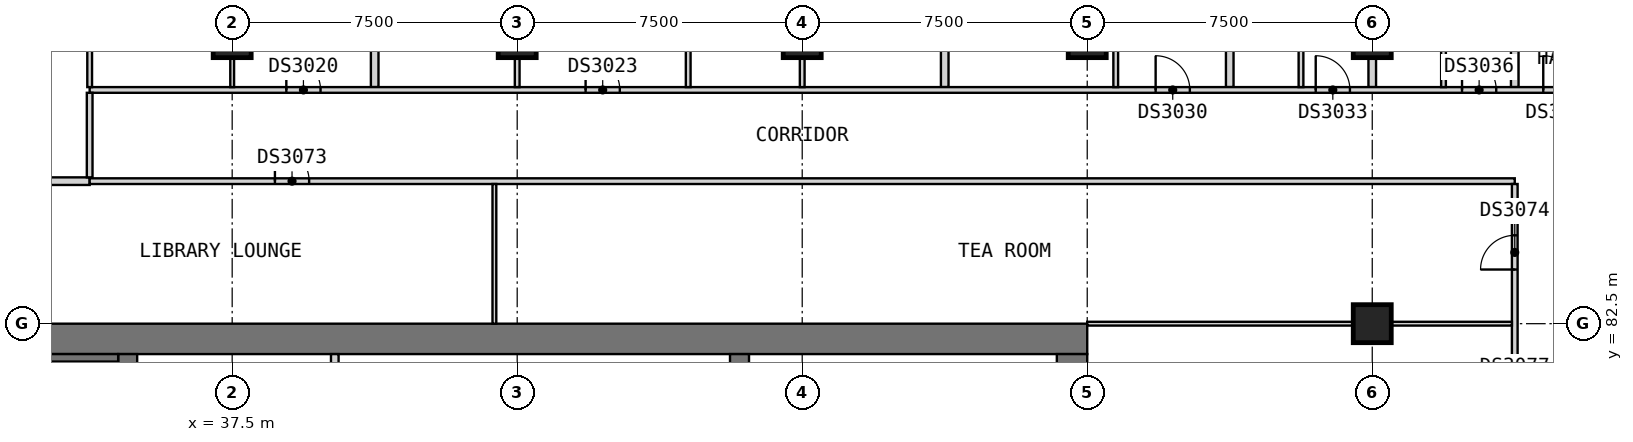
"""IFC4 building model, lengths in metres.
Left out: names, types, materials, properties, quantities, classifications, styles, units other than length and angle.
Written with IfcOpenShell. Run it as: python <this file> out.ifc"""

import sys

from ifc_helpers import new_model, si_unit, direction, frame, frame_2d, origin, origin_2d, place, context, subcontext, project, spatial, rectangle, extrude, element, fill, save


model = new_model("IFC4")
c1 = context("Model", 3, precision=1e-05, world=origin(), true_north=direction((0.0, 1.0)))
c2 = subcontext(c1, "Body", "Model", "MODEL_VIEW")
j1 = project(units=[si_unit("LENGTHUNIT", "METRE"), si_unit("PLANEANGLEUNIT", "RADIAN")], contexts=[c1])
p1 = place(None, origin())
s1 = spatial("IfcSite", under=j1, at=p1, CompositionType="ELEMENT")
p2 = place(p1, origin())
s2 = spatial("IfcBuilding", under=s1, at=p2, CompositionType="ELEMENT")
p3 = place(p2, frame((0.0, 0.0, 137.4)))
s3 = spatial("IfcBuildingStorey", under=s2, at=p3, CompositionType="ELEMENT", Elevation=137.4)
for number, where, z_axis, x_axis in (
    (1, (37.5, 90.0, 0.0), (0.0, 0.0, 1.0), (1.0, 0.0, 0.0)),
    (2, (45.0, 90.0, 0.0), (0.0, 0.0, 1.0), (1.0, 0.0, 0.0)),
    (3, (52.5, 90.0, 0.0), (0.0, 0.0, 1.0), (1.0, 0.0, 0.0)),
    (4, (60.0, 90.0, 0.0), (0.0, 0.0, 1.0), (1.0, 0.0, 0.0)),
    (5, (67.5, 82.5, 0.0), (0.0, 0.0, 1.0), (1.0, 0.0, 0.0)),
    (6, (67.5, 90.0, 0.0), (0.0, 0.0, 1.0), (1.0, 0.0, 0.0)),
):
    element("IfcColumn", number, at=place(p3, frame(where, z_axis=z_axis, x_axis=x_axis)), inside=s3, PredefinedType="COLUMN", context=c2, shape_type="SweptSolid", body=[
        extrude(rectangle(XDim=1.0, YDim=1.0, at=origin_2d()), origin(), (0.0, 0.0, 1.0), 3.6),
    ])
p4 = place(p3, frame((30.0, 82.1, 0.0), z_axis=(0.0, 0.0, 1.0), x_axis=(1.0, 0.0, 0.0)))
e7 = element("IfcWall", 7, at=p4, inside=s3, PredefinedType="SHEAR", context=c2, shape_type="SweptSolid", body=[
    extrude(rectangle(XDim=30.0, YDim=0.8, at=frame_2d((15.0, 0.0))), origin(), (0.0, 0.0, 1.0), 3.6),
])
p5 = place(p3, frame((59.6, 60.8, 0.0), z_axis=(0.0, 0.0, 1.0), x_axis=(0.0, 1.0, 0.0)))
e8 = element("IfcWall", 8, at=p5, inside=s3, PredefinedType="SHEAR", context=c2, shape_type="SweptSolid", body=[
    extrude(rectangle(XDim=20.9, YDim=0.8, at=frame_2d((10.45, 0.0))), origin(), (0.0, 0.0, 1.0), 3.6),
])
p6 = place(p5, frame((14.7, 0.0, 0.0)))
e9 = element("IfcOpeningElement", 9, at=p6, cuts=e8, PredefinedType="OPENING", context=c2, shape_type="SweptSolid", body=[
    extrude(rectangle(XDim=1.8, YDim=2.1, at=frame_2d((0.9, 1.05))), frame((0.0, 0.41, 0.0), z_axis=(0.0, -1.0, 0.0), x_axis=(1.0, 0.0, 0.0)), (0.0, 0.0, 1.0), 0.82),
])
for number, where, z_axis, x_axis in (
    (10, (34.75, 78.3, 0.0), (0.0, 0.0, 1.0), (0.0, 1.0, 0.0)),
    (11, (50.85, 78.3, 0.0), (0.0, 0.0, 1.0), (0.0, 1.0, 0.0)),
):
    element("IfcWall", number, at=place(p3, frame(where, z_axis=z_axis, x_axis=x_axis)), inside=s3, PredefinedType="SHEAR", context=c2, shape_type="SweptSolid", body=[
        extrude(rectangle(XDim=3.4, YDim=0.5, at=frame_2d((1.7, 0.0))), origin(), (0.0, 0.0, 1.0), 3.6),
    ])
p7 = place(p3, frame((40.2, 78.5, 0.0), z_axis=(0.0, 0.0, 1.0), x_axis=(0.0, 1.0, 0.0)))
e12 = element("IfcWall", 12, at=p7, inside=s3, PredefinedType="SOLIDWALL", context=c2, shape_type="SweptSolid", body=[
    extrude(rectangle(XDim=3.2, YDim=0.2, at=frame_2d((1.6, 0.0))), origin(), (0.0, 0.0, 1.0), 3.6),
])
p8 = place(p3, frame((31.0, 81.6, 0.0), z_axis=(0.0, 0.0, 1.0), x_axis=(1.0, 0.0, 0.0)))
e13 = element("IfcWall", 13, at=p8, inside=s3, PredefinedType="SOLIDWALL", context=c2, shape_type="SweptSolid", body=[
    extrude(rectangle(XDim=3.5, YDim=0.2, at=frame_2d((1.75, 0.0))), origin(), (0.0, 0.0, 1.0), 3.35),
])
p9 = place(p3, frame((30.81, 86.25, 0.0), z_axis=(0.0, 0.0, 1.0), x_axis=(1.0, 0.0, 0.0)))
e14 = element("IfcWall", 14, at=p9, inside=s3, PredefinedType="PARTITIONING", context=c2, shape_type="SweptSolid", body=[
    extrude(rectangle(XDim=2.94, YDim=0.2, at=frame_2d((1.47, 0.0))), origin(), (0.0, 0.0, 1.0), 3.35),
])
for number, where, z_axis, x_axis in (
    (15, (41.25, 88.725, 0.0), (0.0, 0.0, 1.0), (0.0, 1.0, 0.0)),
    (16, (56.25, 88.725, 0.0), (0.0, 0.0, 1.0), (0.0, 1.0, 0.0)),
    (17, (63.75, 88.725, 0.0), (0.0, 0.0, 1.0), (0.0, 1.0, 0.0)),
):
    element("IfcWall", number, at=place(p3, frame(where, z_axis=z_axis, x_axis=x_axis)), inside=s3, PredefinedType="PARTITIONING", context=c2, shape_type="SweptSolid", body=[
        extrude(rectangle(XDim=11.715, YDim=0.2, at=frame_2d((5.857, 0.0))), origin(), (0.0, 0.0, 1.0), 3.35),
    ])
p10 = place(p3, frame((67.5, 88.725, 0.0), z_axis=(0.0, 0.0, 1.0), x_axis=(0.0, 1.0, 0.0)))
e18 = element("IfcWall", 18, at=p10, inside=s3, PredefinedType="PARTITIONING", context=c2, shape_type="SweptSolid", body=[
    extrude(rectangle(XDim=12.525, YDim=0.2, at=frame_2d((6.262, 0.0))), origin(), (0.0, 0.0, 1.0), 3.35),
])
p11 = place(p3, frame((71.25, 88.725, 0.0), z_axis=(0.0, 0.0, 1.0), x_axis=(0.0, 1.0, 0.0)))
e19 = element("IfcWall", 19, at=p11, inside=s3, PredefinedType="PARTITIONING", context=c2, shape_type="SweptSolid", body=[
    extrude(rectangle(XDim=11.715, YDim=0.2, at=frame_2d((5.857, 0.0))), origin(), (0.0, 0.0, 1.0), 3.35),
])
p12 = place(p3, frame((33.75, 86.25, 0.0), z_axis=(0.0, 0.0, 1.0), x_axis=(1.0, 0.0, 0.0)))
e20 = element("IfcWall", 20, at=p12, inside=s3, PredefinedType="PARTITIONING", context=c2, shape_type="SweptSolid", body=[
    extrude(rectangle(XDim=37.5, YDim=0.15, at=frame_2d((18.75, 0.0))), origin(), (0.0, 0.0, 1.0), 3.35),
])
p13 = place(p12, frame((4.875, 0.0, 0.0)))
e21 = element("IfcOpeningElement", 21, at=p13, cuts=e20, PredefinedType="OPENING", context=c2, shape_type="SweptSolid", body=[
    extrude(rectangle(XDim=0.9, YDim=2.1, at=frame_2d((0.45, 1.05))), frame((0.0, 0.085, 0.0), z_axis=(0.0, -1.0, 0.0), x_axis=(1.0, 0.0, 0.0)), (0.0, 0.0, 1.0), 0.17),
])
p14 = place(p3, frame((33.75, 88.65, 0.0), z_axis=(0.0, 0.0, 1.0), x_axis=(1.0, 0.0, 0.0)))
e22 = element("IfcWall", 22, at=p14, inside=s3, PredefinedType="PARTITIONING", context=c2, shape_type="SweptSolid", body=[
    extrude(rectangle(XDim=39.9, YDim=0.15, at=frame_2d((19.95, 0.0))), origin(), (0.0, 0.0, 1.0), 3.35),
])
p15 = place(p14, frame((5.175, 0.0, 0.0)))
e23 = element("IfcOpeningElement", 23, at=p15, cuts=e22, PredefinedType="OPENING", context=c2, shape_type="SweptSolid", body=[
    extrude(rectangle(XDim=0.9, YDim=2.1, at=frame_2d((0.45, 1.05))), frame((0.0, 0.085, 0.0), z_axis=(0.0, -1.0, 0.0), x_axis=(1.0, 0.0, 0.0)), (0.0, 0.0, 1.0), 0.17),
])
p16 = place(p14, frame((13.05, 0.0, 0.0)))
e24 = element("IfcOpeningElement", 24, at=p16, cuts=e22, PredefinedType="OPENING", context=c2, shape_type="SweptSolid", body=[
    extrude(rectangle(XDim=0.9, YDim=2.1, at=frame_2d((0.45, 1.05))), frame((0.0, 0.085, 0.0), z_axis=(0.0, -1.0, 0.0), x_axis=(1.0, 0.0, 0.0)), (0.0, 0.0, 1.0), 0.17),
])
p17 = place(p14, frame((28.05, 0.0, 0.0)))
e25 = element("IfcOpeningElement", 25, at=p17, cuts=e22, PredefinedType="OPENING", context=c2, shape_type="SweptSolid", body=[
    extrude(rectangle(XDim=0.9, YDim=2.1, at=frame_2d((0.45, 1.05))), frame((0.0, 0.085, 0.0), z_axis=(0.0, -1.0, 0.0), x_axis=(1.0, 0.0, 0.0)), (0.0, 0.0, 1.0), 0.17),
])
p18 = place(p14, frame((32.262, 0.0, 0.0)))
e26 = element("IfcOpeningElement", 26, at=p18, cuts=e22, PredefinedType="OPENING", context=c2, shape_type="SweptSolid", body=[
    extrude(rectangle(XDim=0.9, YDim=2.1, at=frame_2d((0.45, 1.05))), frame((0.0, 0.085, 0.0), z_axis=(0.0, -1.0, 0.0), x_axis=(1.0, 0.0, 0.0)), (0.0, 0.0, 1.0), 0.17),
])
p19 = place(p14, frame((36.113, 0.0, 0.0)))
e27 = element("IfcOpeningElement", 27, at=p19, cuts=e22, PredefinedType="OPENING", context=c2, shape_type="SweptSolid", body=[
    extrude(rectangle(XDim=0.9, YDim=2.1, at=frame_2d((0.45, 1.05))), frame((0.0, 0.085, 0.0), z_axis=(0.0, -1.0, 0.0), x_axis=(1.0, 0.0, 0.0)), (0.0, 0.0, 1.0), 0.17),
])
p20 = place(p14, frame((38.25, 0.0, 0.0)))
e28 = element("IfcOpeningElement", 28, at=p20, cuts=e22, PredefinedType="OPENING", context=c2, shape_type="SweptSolid", body=[
    extrude(rectangle(XDim=0.9, YDim=2.1, at=frame_2d((0.45, 1.05))), frame((0.0, 0.085, 0.0), z_axis=(0.0, -1.0, 0.0), x_axis=(1.0, 0.0, 0.0)), (0.0, 0.0, 1.0), 0.17),
])
p21 = place(p3, frame((33.75, 86.35, 0.0), z_axis=(0.0, 0.0, 1.0), x_axis=(0.0, 1.0, 0.0)))
e29 = element("IfcWall", 29, at=p21, inside=s3, PredefinedType="PARTITIONING", context=c2, shape_type="SweptSolid", body=[
    extrude(rectangle(XDim=2.225, YDim=0.15, at=frame_2d((1.112, 0.0))), origin(), (0.0, 0.0, 1.0), 3.35),
])
p22 = place(p3, frame((71.25, 78.075, 0.0), z_axis=(0.0, 0.0, 1.0), x_axis=(0.0, 1.0, 0.0)))
e30 = element("IfcWall", 30, at=p22, inside=s3, PredefinedType="PARTITIONING", context=c2, shape_type="SweptSolid", body=[
    extrude(rectangle(XDim=8.1, YDim=0.15, at=frame_2d((4.05, 0.0))), origin(), (0.0, 0.0, 1.0), 3.35),
])
p23 = place(p22, frame((5.85, 0.0, 0.0)))
e31 = element("IfcOpeningElement", 31, at=p23, cuts=e30, PredefinedType="OPENING", context=c2, shape_type="SweptSolid", body=[
    extrude(rectangle(XDim=0.9, YDim=2.1, at=frame_2d((0.45, 1.05))), frame((0.0, 0.085, 0.0), z_axis=(0.0, -1.0, 0.0), x_axis=(1.0, 0.0, 0.0)), (0.0, 0.0, 1.0), 0.17),
])
p24 = place(p22, frame((1.725, 0.0, 0.0)))
e32 = element("IfcOpeningElement", 32, at=p24, cuts=e30, PredefinedType="OPENING", context=c2, shape_type="SweptSolid", body=[
    extrude(rectangle(XDim=0.9, YDim=2.1, at=frame_2d((0.45, 1.05))), frame((0.0, 0.085, 0.0), z_axis=(0.0, -1.0, 0.0), x_axis=(1.0, 0.0, 0.0)), (0.0, 0.0, 1.0), 0.17),
])
p25 = place(p3, frame((60.0, 82.5, 0.0), z_axis=(0.0, 0.0, 1.0), x_axis=(1.0, 0.0, 0.0)))
e33 = element("IfcWall", 33, at=p25, inside=s3, PredefinedType="PARTITIONING", context=c2, shape_type="SweptSolid", body=[
    extrude(rectangle(XDim=11.175, YDim=0.1, at=frame_2d((5.587, 0.0))), origin(), (0.0, 0.0, 1.0), 3.35),
])
p26 = place(p3, frame((37.5, 88.725, 0.0), z_axis=(0.0, 0.0, 1.0), x_axis=(0.0, 1.0, 0.0)))
e34 = element("IfcWall", 34, at=p26, inside=s3, PredefinedType="PARTITIONING", context=c2, shape_type="SweptSolid", body=[
    extrude(rectangle(XDim=4.475, YDim=0.1, at=frame_2d((2.237, 0.0))), origin(), (0.0, 0.0, 1.0), 3.35),
])
p27 = place(p26, frame((1.825, 0.0, 0.0)))
e35 = element("IfcOpeningElement", 35, at=p27, cuts=e34, PredefinedType="OPENING", context=c2, shape_type="SweptSolid", body=[
    extrude(rectangle(XDim=0.9, YDim=2.1, at=frame_2d((0.45, 1.05))), frame((0.0, 0.06, 0.0), z_axis=(0.0, -1.0, 0.0), x_axis=(1.0, 0.0, 0.0)), (0.0, 0.0, 1.0), 0.12),
])
p28 = place(p3, frame((44.4, 82.5, 0.0), z_axis=(0.0, 0.0, 1.0), x_axis=(0.0, 1.0, 0.0)))
e36 = element("IfcWall", 36, at=p28, inside=s3, PredefinedType="PARTITIONING", context=c2, shape_type="SweptSolid", body=[
    extrude(rectangle(XDim=3.675, YDim=0.1, at=frame_2d((1.837, 0.0))), origin(), (0.0, 0.0, 1.0), 3.35),
])
for number, where, z_axis, x_axis in (
    (37, (33.75, 88.725, 0.0), (0.0, 0.0, 1.0), (0.0, 1.0, 0.0)),
    (38, (45.0, 88.725, 0.0), (0.0, 0.0, 1.0), (0.0, 1.0, 0.0)),
):
    element("IfcWall", number, at=place(p3, frame(where, z_axis=z_axis, x_axis=x_axis)), inside=s3, PredefinedType="PARTITIONING", context=c2, shape_type="SweptSolid", body=[
        extrude(rectangle(XDim=4.462, YDim=0.125, at=frame_2d((2.231, 0.0))), origin(), (0.0, 0.0, 1.0), 3.35),
    ])
p29 = place(p3, frame((49.5, 88.725, 0.0), z_axis=(0.0, 0.0, 1.0), x_axis=(0.0, 1.0, 0.0)))
e39 = element("IfcWall", 39, at=p29, inside=s3, PredefinedType="PARTITIONING", context=c2, shape_type="SweptSolid", body=[
    extrude(rectangle(XDim=4.462, YDim=0.125, at=frame_2d((2.231, 0.0))), origin(), (0.0, 0.0, 1.0), 3.35),
])
p30 = place(p29, frame((1.775, 0.0, 0.0)))
e40 = element("IfcOpeningElement", 40, at=p30, cuts=e39, PredefinedType="OPENING", context=c2, shape_type="SweptSolid", body=[
    extrude(rectangle(XDim=0.9, YDim=2.1, at=frame_2d((0.45, 1.05))), frame((0.0, 0.073, 0.0), z_axis=(0.0, -1.0, 0.0), x_axis=(1.0, 0.0, 0.0)), (0.0, 0.0, 1.0), 0.145),
])
for number, where, z_axis, x_axis in (
    (41, (52.5, 88.725, 0.0), (0.0, 0.0, 1.0), (0.0, 1.0, 0.0)),
    (42, (60.75, 88.725, 0.0), (0.0, 0.0, 1.0), (0.0, 1.0, 0.0)),
    (43, (65.625, 88.725, 0.0), (0.0, 0.0, 1.0), (0.0, 1.0, 0.0)),
    (44, (69.375, 88.725, 0.0), (0.0, 0.0, 1.0), (0.0, 1.0, 0.0)),
):
    element("IfcWall", number, at=place(p3, frame(where, z_axis=z_axis, x_axis=x_axis)), inside=s3, PredefinedType="PARTITIONING", context=c2, shape_type="SweptSolid", body=[
        extrude(rectangle(XDim=4.462, YDim=0.125, at=frame_2d((2.231, 0.0))), origin(), (0.0, 0.0, 1.0), 3.35),
    ])
p31 = place(p15, origin())
e45 = element("IfcDoor", 45, at=p31, inside=s3, OperationType="SINGLE_SWING_LEFT", PredefinedType="DOOR", context=c2, shape_type="SweptSolid", body=[
    extrude(rectangle(XDim=0.9, YDim=2.1, at=frame_2d((0.45, 1.05))), frame((0.0, 0.025, 0.0), z_axis=(0.0, -1.0, 0.0), x_axis=(1.0, 0.0, 0.0)), (0.0, 0.0, 1.0), 0.05),
])
fill(e23, e45)
p32 = place(p16, origin())
e46 = element("IfcDoor", 46, at=p32, inside=s3, OperationType="SINGLE_SWING_LEFT", PredefinedType="DOOR", context=c2, shape_type="SweptSolid", body=[
    extrude(rectangle(XDim=0.9, YDim=2.1, at=frame_2d((0.45, 1.05))), frame((0.0, 0.025, 0.0), z_axis=(0.0, -1.0, 0.0), x_axis=(1.0, 0.0, 0.0)), (0.0, 0.0, 1.0), 0.05),
])
fill(e24, e46)
p33 = place(p17, origin())
e47 = element("IfcDoor", 47, at=p33, inside=s3, OperationType="SINGLE_SWING_LEFT", PredefinedType="DOOR", context=c2, shape_type="SweptSolid", body=[
    extrude(rectangle(XDim=0.9, YDim=2.1, at=frame_2d((0.45, 1.05))), frame((0.0, 0.025, 0.0), z_axis=(0.0, -1.0, 0.0), x_axis=(1.0, 0.0, 0.0)), (0.0, 0.0, 1.0), 0.05),
])
fill(e25, e47)
p34 = place(p18, origin())
e48 = element("IfcDoor", 48, at=p34, inside=s3, OperationType="SINGLE_SWING_LEFT", PredefinedType="DOOR", context=c2, shape_type="SweptSolid", body=[
    extrude(rectangle(XDim=0.9, YDim=2.1, at=frame_2d((0.45, 1.05))), frame((0.0, 0.025, 0.0), z_axis=(0.0, -1.0, 0.0), x_axis=(1.0, 0.0, 0.0)), (0.0, 0.0, 1.0), 0.05),
])
fill(e26, e48)
p35 = place(p19, origin())
e49 = element("IfcDoor", 49, at=p35, inside=s3, OperationType="SINGLE_SWING_LEFT", PredefinedType="DOOR", context=c2, shape_type="SweptSolid", body=[
    extrude(rectangle(XDim=0.9, YDim=2.1, at=frame_2d((0.45, 1.05))), frame((0.0, 0.025, 0.0), z_axis=(0.0, -1.0, 0.0), x_axis=(1.0, 0.0, 0.0)), (0.0, 0.0, 1.0), 0.05),
])
fill(e27, e49)
p36 = place(p20, origin())
e50 = element("IfcDoor", 50, at=p36, inside=s3, OperationType="SINGLE_SWING_RIGHT", PredefinedType="DOOR", context=c2, shape_type="SweptSolid", body=[
    extrude(rectangle(XDim=0.9, YDim=2.1, at=frame_2d((0.45, 1.05))), frame((0.0, 0.025, 0.0), z_axis=(0.0, -1.0, 0.0), x_axis=(1.0, 0.0, 0.0)), (0.0, 0.0, 1.0), 0.05),
])
fill(e28, e50)
p37 = place(p13, origin())
e51 = element("IfcDoor", 51, at=p37, inside=s3, OperationType="SINGLE_SWING_RIGHT", PredefinedType="DOOR", context=c2, shape_type="SweptSolid", body=[
    extrude(rectangle(XDim=0.9, YDim=2.1, at=frame_2d((0.45, 1.05))), frame((0.0, 0.025, 0.0), z_axis=(0.0, -1.0, 0.0), x_axis=(1.0, 0.0, 0.0)), (0.0, 0.0, 1.0), 0.05),
])
fill(e21, e51)
p38 = place(p23, origin())
e52 = element("IfcDoor", 52, at=p38, inside=s3, OperationType="SINGLE_SWING_LEFT", PredefinedType="DOOR", context=c2, shape_type="SweptSolid", body=[
    extrude(rectangle(XDim=0.9, YDim=2.1, at=frame_2d((0.45, 1.05))), frame((0.0, 0.025, 0.0), z_axis=(0.0, -1.0, 0.0), x_axis=(1.0, 0.0, 0.0)), (0.0, 0.0, 1.0), 0.05),
])
fill(e31, e52)
save(model, sys.argv[1])
